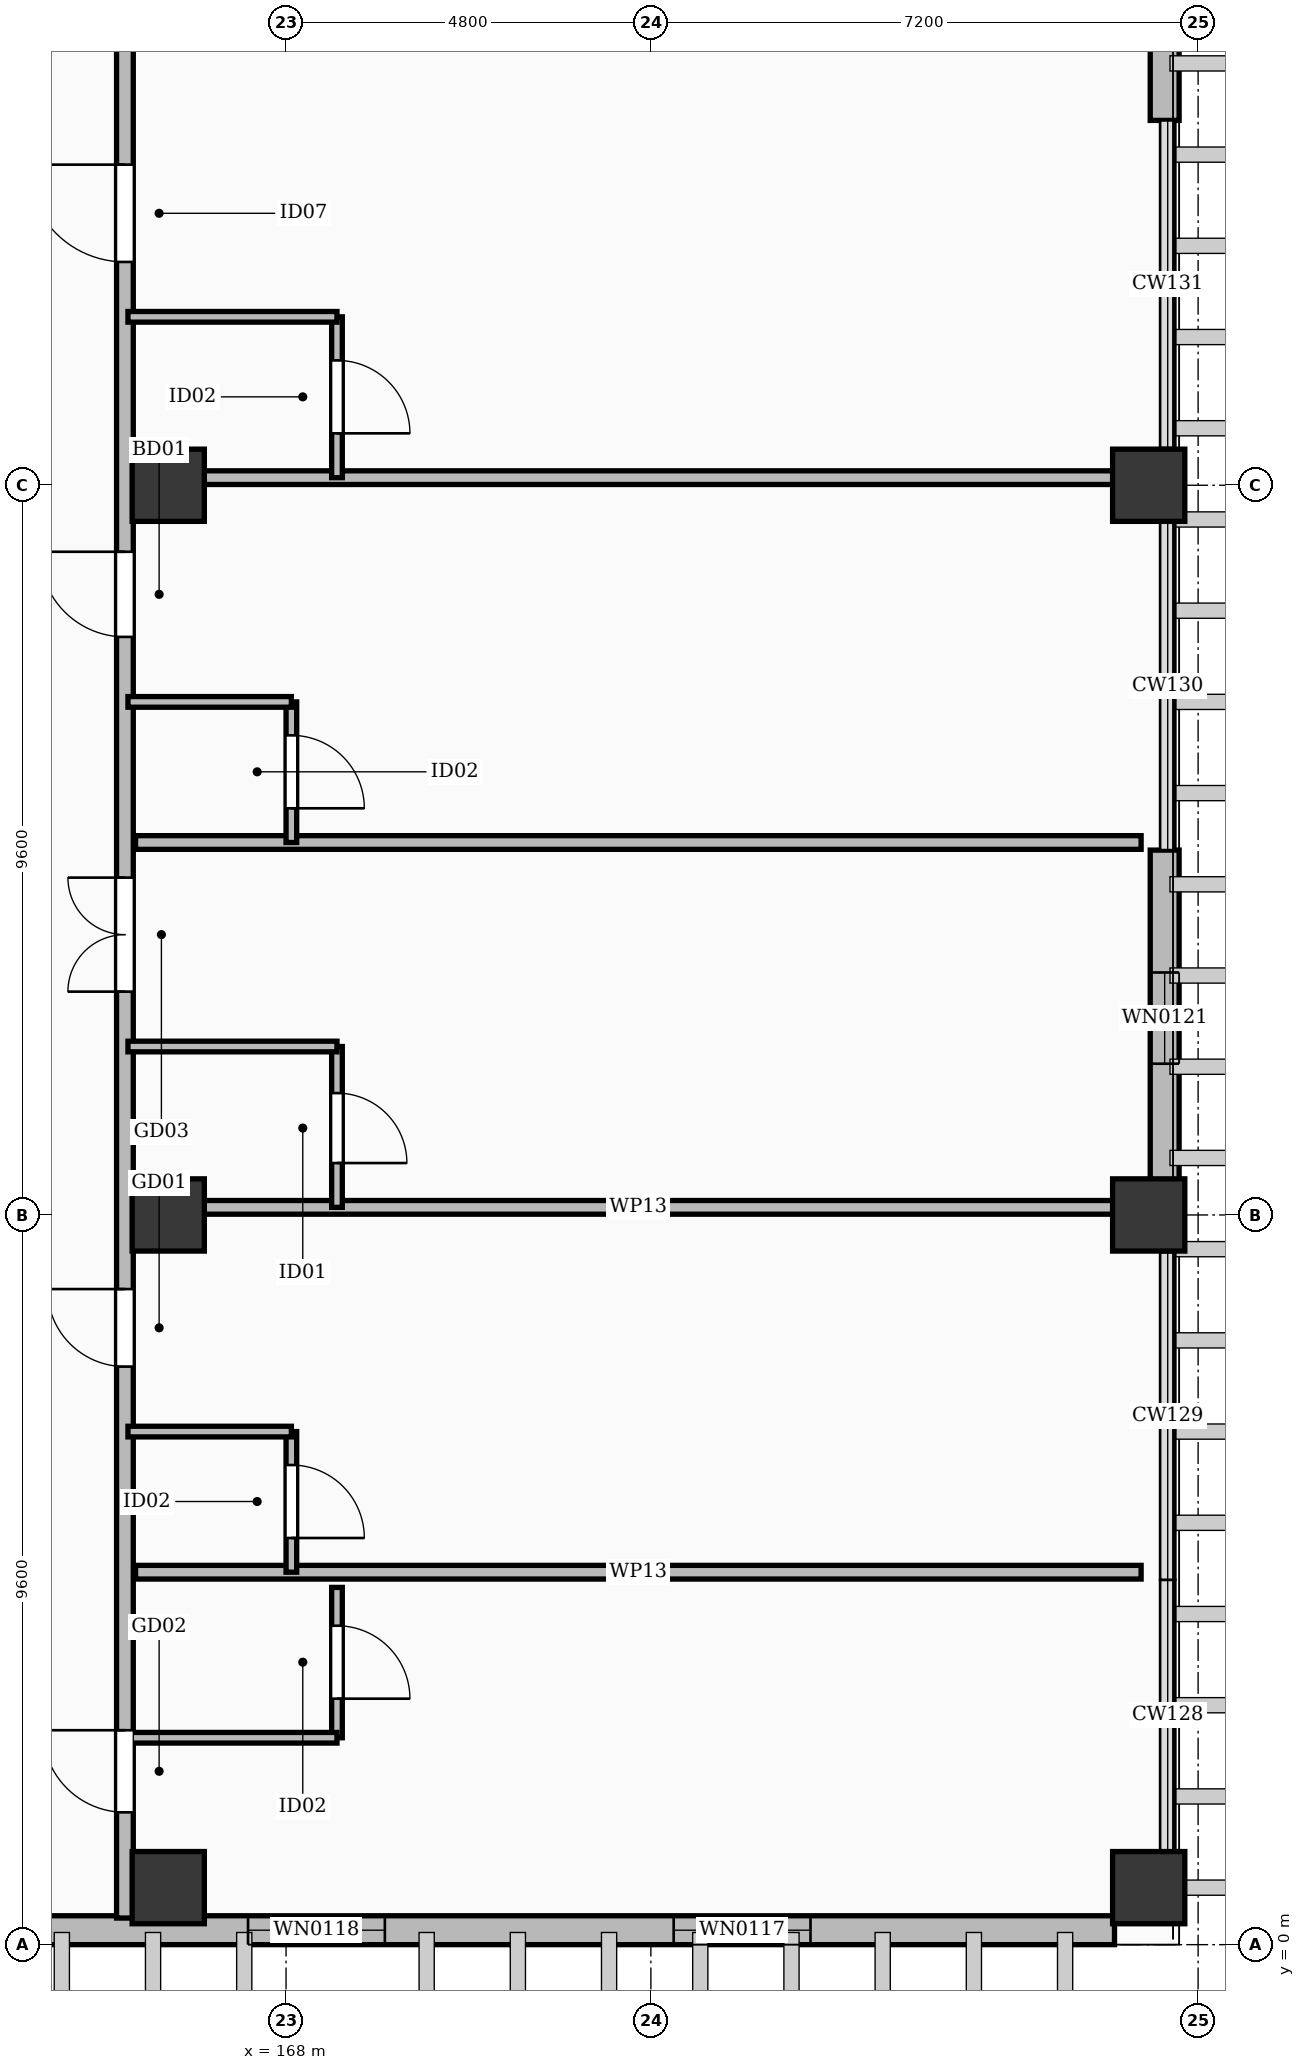
"""IFC4 building model, lengths in metres.
Left out: names, types, materials, properties, quantities, classifications, styles, units other than length and angle.
Written with IfcOpenShell. Run it as: python <this file> out.ifc"""

import sys

from ifc_helpers import new_model, si_unit, direction, frame, frame_2d, origin, origin_2d, place, context, subcontext, project, spatial, rectangle, extrude, element, fill, save


model = new_model("IFC4")
c1 = context("Model", 3, precision=1e-05, world=origin(), true_north=direction((0.0, 1.0)))
c2 = subcontext(c1, "Body", "Model", "MODEL_VIEW")
j1 = project(units=[si_unit("LENGTHUNIT", "METRE"), si_unit("PLANEANGLEUNIT", "RADIAN")], contexts=[c1])
p1 = place(None, origin())
s1 = spatial("IfcSite", under=j1, at=p1, CompositionType="ELEMENT")
p2 = place(p1, origin())
s2 = spatial("IfcBuilding", under=s1, at=p2, CompositionType="ELEMENT")
p3 = place(p2, frame((0.0, 0.0, 11.4)))
s3 = spatial("IfcBuildingStorey", under=s2, at=p3, CompositionType="ELEMENT", Elevation=11.4)
for number, where, z_axis, x_axis in (
    (1, (166.45, 0.75, 0.0), (0.0, 0.0, 1.0), (1.0, 0.0, 0.0)),
    (2, (166.45, 9.6, 0.0), (0.0, 0.0, 1.0), (1.0, 0.0, 0.0)),
    (3, (166.45, 19.2, 0.0), (0.0, 0.0, 1.0), (1.0, 0.0, 0.0)),
    (4, (179.35, 0.75, 0.0), (0.0, 0.0, 1.0), (1.0, 0.0, 0.0)),
    (5, (179.35, 9.6, 0.0), (0.0, 0.0, 1.0), (1.0, 0.0, 0.0)),
    (6, (179.35, 19.2, 0.0), (0.0, 0.0, 1.0), (1.0, 0.0, 0.0)),
):
    element("IfcColumn", number, at=place(p3, frame(where, z_axis=z_axis, x_axis=x_axis)), inside=s3, PredefinedType="COLUMN", context=c2, shape_type="SweptSolid", body=[
        extrude(rectangle(XDim=0.95, YDim=0.95, at=origin_2d()), origin(), (0.0, 0.0, 1.0), 4.8),
    ])
p4 = place(p3, frame((178.9, 0.19, 0.0), z_axis=(0.0, 0.0, 1.0), x_axis=(-1.0, 0.0, 0.0)))
e7 = element("IfcWall", 7, at=p4, inside=s3, PredefinedType="SOLIDWALL", context=c2, shape_type="SweptSolid", body=[
    extrude(rectangle(XDim=29.0, YDim=0.38, at=frame_2d((14.5, 0.0))), origin(), (0.0, 0.0, 1.0), 4.42),
])
p5 = place(p4, frame((4.0, 0.0, 0.55)))
e8 = element("IfcOpeningElement", 8, at=p5, cuts=e7, PredefinedType="OPENING", context=c2, shape_type="SweptSolid", body=[
    extrude(rectangle(XDim=1.8, YDim=1.76, at=frame_2d((0.9, 0.88))), frame((0.0, 0.202, 0.0), z_axis=(0.0, -1.0, 0.0), x_axis=(1.0, 0.0, 0.0)), (0.0, 0.0, 1.0), 0.404),
])
p6 = place(p4, frame((9.6, 0.0, 0.55)))
e9 = element("IfcOpeningElement", 9, at=p6, cuts=e7, PredefinedType="OPENING", context=c2, shape_type="SweptSolid", body=[
    extrude(rectangle(XDim=1.8, YDim=1.76, at=frame_2d((0.9, 0.88))), frame((0.0, 0.202, 0.0), z_axis=(0.0, -1.0, 0.0), x_axis=(1.0, 0.0, 0.0)), (0.0, 0.0, 1.0), 0.404),
])
p7 = place(p4, frame((20.8, 0.0, 0.55)))
e10 = element("IfcOpeningElement", 10, at=p7, cuts=e7, PredefinedType="OPENING", context=c2, shape_type="SweptSolid", body=[
    extrude(rectangle(XDim=1.8, YDim=1.76, at=frame_2d((0.9, 0.88))), frame((0.0, 0.202, 0.0), z_axis=(0.0, -1.0, 0.0), x_axis=(1.0, 0.0, 0.0)), (0.0, 0.0, 1.0), 0.404),
])
p8 = place(p4, frame((25.4, 0.0, 0.55)))
e11 = element("IfcOpeningElement", 11, at=p8, cuts=e7, PredefinedType="OPENING", context=c2, shape_type="SweptSolid", body=[
    extrude(rectangle(XDim=1.8, YDim=1.76, at=frame_2d((0.9, 0.88))), frame((0.0, 0.202, 0.0), z_axis=(0.0, -1.0, 0.0), x_axis=(1.0, 0.0, 0.0)), (0.0, 0.0, 1.0), 0.404),
])
p9 = place(p3, frame((179.56, 14.4, 0.0), z_axis=(0.0, 0.0, 1.0), x_axis=(0.0, -1.0, 0.0)))
e12 = element("IfcWall", 12, at=p9, inside=s3, PredefinedType="SOLIDWALL", context=c2, shape_type="SweptSolid", body=[
    extrude(rectangle(XDim=4.35, YDim=0.38, at=frame_2d((2.175, 0.0))), origin(), (0.0, 0.0, 1.0), 3.662),
])
p10 = place(p9, frame((1.61, 0.0, 0.55)))
e13 = element("IfcOpeningElement", 13, at=p10, cuts=e12, PredefinedType="OPENING", context=c2, shape_type="SweptSolid", body=[
    extrude(rectangle(XDim=1.2, YDim=1.72, at=frame_2d((0.6, 0.86))), frame((0.0, 0.202, 0.0), z_axis=(0.0, -1.0, 0.0), x_axis=(1.0, 0.0, 0.0)), (0.0, 0.0, 1.0), 0.404),
])
p11 = place(p3, frame((179.56, 28.35, 0.0), z_axis=(0.0, 0.0, 1.0), x_axis=(0.0, -1.0, 0.0)))
e14 = element("IfcWall", 14, at=p11, inside=s3, PredefinedType="SOLIDWALL", context=c2, shape_type="SweptSolid", body=[
    extrude(rectangle(XDim=4.35, YDim=0.38, at=frame_2d((2.175, 0.0))), origin(), (0.0, 0.0, 1.0), 3.662),
])
p12 = place(p3, frame((165.88, 0.35, 0.0), z_axis=(0.0, 0.0, 1.0), x_axis=(0.0, 1.0, 0.0)))
e15 = element("IfcWall", 15, at=p12, inside=s3, PredefinedType="PARTITIONING", context=c2, shape_type="SweptSolid", body=[
    extrude(rectangle(XDim=28.25, YDim=0.22, at=frame_2d((14.125, 0.0))), origin(), (0.0, 0.0, 1.0), 3.662),
])
p13 = place(p12, frame((1.391, 0.0, 0.0)))
e16 = element("IfcOpeningElement", 16, at=p13, cuts=e15, PredefinedType="OPENING", context=c2, shape_type="SweptSolid", body=[
    extrude(rectangle(XDim=1.08, YDim=2.25, at=frame_2d((0.54, 1.125))), frame((0.0, 0.122, 0.0), z_axis=(0.0, -1.0, 0.0), x_axis=(1.0, 0.0, 0.0)), (0.0, 0.0, 1.0), 0.244),
])
p14 = place(p12, frame((7.255, 0.0, 0.0)))
e17 = element("IfcOpeningElement", 17, at=p14, cuts=e15, PredefinedType="OPENING", context=c2, shape_type="SweptSolid", body=[
    extrude(rectangle(XDim=1.02, YDim=2.2, at=frame_2d((0.51, 1.1))), frame((0.0, 0.122, 0.0), z_axis=(0.0, -1.0, 0.0), x_axis=(1.0, 0.0, 0.0)), (0.0, 0.0, 1.0), 0.244),
])
p15 = place(p12, frame((12.188, 0.0, 0.0)))
e18 = element("IfcOpeningElement", 18, at=p15, cuts=e15, PredefinedType="OPENING", context=c2, shape_type="SweptSolid", body=[
    extrude(rectangle(XDim=1.5, YDim=2.3, at=frame_2d((0.75, 1.15))), frame((0.0, 0.122, 0.0), z_axis=(0.0, -1.0, 0.0), x_axis=(1.0, 0.0, 0.0)), (0.0, 0.0, 1.0), 0.244),
])
p16 = place(p12, frame((16.855, 0.0, 0.0)))
e19 = element("IfcOpeningElement", 19, at=p16, cuts=e15, PredefinedType="OPENING", context=c2, shape_type="SweptSolid", body=[
    extrude(rectangle(XDim=1.12, YDim=2.15, at=frame_2d((0.56, 1.075))), frame((0.0, 0.122, 0.0), z_axis=(0.0, -1.0, 0.0), x_axis=(1.0, 0.0, 0.0)), (0.0, 0.0, 1.0), 0.244),
])
p17 = place(p12, frame((21.788, 0.0, 0.0)))
e20 = element("IfcOpeningElement", 20, at=p17, cuts=e15, PredefinedType="OPENING", context=c2, shape_type="SweptSolid", body=[
    extrude(rectangle(XDim=1.28, YDim=2.16, at=frame_2d((0.64, 1.08))), frame((0.0, 0.122, 0.0), z_axis=(0.0, -1.0, 0.0), x_axis=(1.0, 0.0, 0.0)), (0.0, 0.0, 1.0), 0.244),
])
p18 = place(p3, frame((168.67, 2.722, 0.0), z_axis=(0.0, 0.0, 1.0), x_axis=(0.0, 1.0, 0.0)))
e21 = element("IfcWall", 21, at=p18, inside=s3, PredefinedType="PARTITIONING", context=c2, shape_type="SweptSolid", body=[
    extrude(rectangle(XDim=1.978, YDim=0.14, at=frame_2d((0.989, 0.0))), origin(), (0.0, 0.0, 1.0), 4.42),
])
p19 = place(p18, frame((0.514, 0.0, 0.0)))
e22 = element("IfcOpeningElement", 22, at=p19, cuts=e21, PredefinedType="OPENING", context=c2, shape_type="SweptSolid", body=[
    extrude(rectangle(XDim=0.96, YDim=2.12, at=frame_2d((0.48, 1.06))), frame((0.0, 0.082, 0.0), z_axis=(0.0, -1.0, 0.0), x_axis=(1.0, 0.0, 0.0)), (0.0, 0.0, 1.0), 0.164),
])
p20 = place(p3, frame((165.92, 2.722, 0.0), z_axis=(0.0, 0.0, 1.0), x_axis=(1.0, 0.0, 0.0)))
e23 = element("IfcWall", 23, at=p20, inside=s3, PredefinedType="PARTITIONING", context=c2, shape_type="SweptSolid", body=[
    extrude(rectangle(XDim=2.75, YDim=0.14, at=frame_2d((1.375, 0.0))), origin(), (0.0, 0.0, 1.0), 3.692),
])
p21 = place(p3, frame((166.02, 4.9, 0.0), z_axis=(0.0, 0.0, 1.0), x_axis=(1.0, 0.0, 0.0)))
e24 = element("IfcWall", 24, at=p21, inside=s3, PredefinedType="PARTITIONING", context=c2, shape_type="SweptSolid", body=[
    extrude(rectangle(XDim=13.23, YDim=0.18, at=frame_2d((6.615, 0.0))), origin(), (0.0, 0.0, 1.0), 3.662),
])
p22 = place(p3, frame((168.07, 4.9, 0.0), z_axis=(0.0, 0.0, 1.0), x_axis=(0.0, 1.0, 0.0)))
e25 = element("IfcWall", 25, at=p22, inside=s3, PredefinedType="PARTITIONING", context=c2, shape_type="SweptSolid", body=[
    extrude(rectangle(XDim=1.85, YDim=0.14, at=frame_2d((0.925, 0.0))), origin(), (0.0, 0.0, 1.0), 4.42),
])
p23 = place(p22, frame((0.45, 0.0, 0.0)))
e26 = element("IfcOpeningElement", 26, at=p23, cuts=e25, PredefinedType="OPENING", context=c2, shape_type="SweptSolid", body=[
    extrude(rectangle(XDim=0.96, YDim=2.12, at=frame_2d((0.48, 1.06))), frame((0.0, 0.082, 0.0), z_axis=(0.0, -1.0, 0.0), x_axis=(1.0, 0.0, 0.0)), (0.0, 0.0, 1.0), 0.164),
])
p24 = place(p3, frame((165.92, 6.75, 0.0), z_axis=(0.0, 0.0, 1.0), x_axis=(1.0, 0.0, 0.0)))
e27 = element("IfcWall", 27, at=p24, inside=s3, PredefinedType="PARTITIONING", context=c2, shape_type="SweptSolid", body=[
    extrude(rectangle(XDim=2.15, YDim=0.14, at=frame_2d((1.075, 0.0))), origin(), (0.0, 0.0, 1.0), 3.692),
])
p25 = place(p3, frame((166.02, 9.7, 0.0), z_axis=(0.0, 0.0, 1.0), x_axis=(1.0, 0.0, 0.0)))
e28 = element("IfcWall", 28, at=p25, inside=s3, PredefinedType="PARTITIONING", context=c2, shape_type="SweptSolid", body=[
    extrude(rectangle(XDim=13.23, YDim=0.18, at=frame_2d((6.615, 0.0))), origin(), (0.0, 0.0, 1.0), 3.662),
])
p26 = place(p3, frame((168.67, 9.7, 0.0), z_axis=(0.0, 0.0, 1.0), x_axis=(0.0, 1.0, 0.0)))
e29 = element("IfcWall", 29, at=p26, inside=s3, PredefinedType="PARTITIONING", context=c2, shape_type="SweptSolid", body=[
    extrude(rectangle(XDim=2.116, YDim=0.14, at=frame_2d((1.058, 0.0))), origin(), (0.0, 0.0, 1.0), 3.692),
])
p27 = place(p26, frame((0.583, 0.0, 0.0)))
e30 = element("IfcOpeningElement", 30, at=p27, cuts=e29, PredefinedType="OPENING", context=c2, shape_type="SweptSolid", body=[
    extrude(rectangle(XDim=0.92, YDim=2.1, at=frame_2d((0.46, 1.05))), frame((0.0, 0.082, 0.0), z_axis=(0.0, -1.0, 0.0), x_axis=(1.0, 0.0, 0.0)), (0.0, 0.0, 1.0), 0.164),
])
p28 = place(p3, frame((165.92, 11.816, 0.0), z_axis=(0.0, 0.0, 1.0), x_axis=(1.0, 0.0, 0.0)))
e31 = element("IfcWall", 31, at=p28, inside=s3, PredefinedType="PARTITIONING", context=c2, shape_type="SweptSolid", body=[
    extrude(rectangle(XDim=2.75, YDim=0.14, at=frame_2d((1.375, 0.0))), origin(), (0.0, 0.0, 1.0), 3.692),
])
p29 = place(p3, frame((166.02, 14.5, 0.0), z_axis=(0.0, 0.0, 1.0), x_axis=(1.0, 0.0, 0.0)))
e32 = element("IfcWall", 32, at=p29, inside=s3, PredefinedType="PARTITIONING", context=c2, shape_type="SweptSolid", body=[
    extrude(rectangle(XDim=13.23, YDim=0.18, at=frame_2d((6.615, 0.0))), origin(), (0.0, 0.0, 1.0), 3.662),
])
p30 = place(p3, frame((168.07, 14.5, 0.0), z_axis=(0.0, 0.0, 1.0), x_axis=(0.0, 1.0, 0.0)))
e33 = element("IfcWall", 33, at=p30, inside=s3, PredefinedType="PARTITIONING", context=c2, shape_type="SweptSolid", body=[
    extrude(rectangle(XDim=1.85, YDim=0.14, at=frame_2d((0.925, 0.0))), origin(), (0.0, 0.0, 1.0), 4.42),
])
p31 = place(p30, frame((0.45, 0.0, 0.0)))
e34 = element("IfcOpeningElement", 34, at=p31, cuts=e33, PredefinedType="OPENING", context=c2, shape_type="SweptSolid", body=[
    extrude(rectangle(XDim=0.96, YDim=2.12, at=frame_2d((0.48, 1.06))), frame((0.0, 0.082, 0.0), z_axis=(0.0, -1.0, 0.0), x_axis=(1.0, 0.0, 0.0)), (0.0, 0.0, 1.0), 0.164),
])
p32 = place(p3, frame((165.92, 16.35, 0.0), z_axis=(0.0, 0.0, 1.0), x_axis=(1.0, 0.0, 0.0)))
e35 = element("IfcWall", 35, at=p32, inside=s3, PredefinedType="PARTITIONING", context=c2, shape_type="SweptSolid", body=[
    extrude(rectangle(XDim=2.15, YDim=0.14, at=frame_2d((1.075, 0.0))), origin(), (0.0, 0.0, 1.0), 3.692),
])
p33 = place(p3, frame((166.02, 19.3, 0.0), z_axis=(0.0, 0.0, 1.0), x_axis=(1.0, 0.0, 0.0)))
e36 = element("IfcWall", 36, at=p33, inside=s3, PredefinedType="PARTITIONING", context=c2, shape_type="SweptSolid", body=[
    extrude(rectangle(XDim=13.23, YDim=0.18, at=frame_2d((6.615, 0.0))), origin(), (0.0, 0.0, 1.0), 3.662),
])
p34 = place(p3, frame((168.67, 19.3, 0.0), z_axis=(0.0, 0.0, 1.0), x_axis=(0.0, 1.0, 0.0)))
e37 = element("IfcWall", 37, at=p34, inside=s3, PredefinedType="PARTITIONING", context=c2, shape_type="SweptSolid", body=[
    extrude(rectangle(XDim=2.116, YDim=0.14, at=frame_2d((1.058, 0.0))), origin(), (0.0, 0.0, 1.0), 3.692),
])
p35 = place(p34, frame((0.583, 0.0, 0.0)))
e38 = element("IfcOpeningElement", 38, at=p35, cuts=e37, PredefinedType="OPENING", context=c2, shape_type="SweptSolid", body=[
    extrude(rectangle(XDim=0.96, YDim=2.12, at=frame_2d((0.48, 1.06))), frame((0.0, 0.082, 0.0), z_axis=(0.0, -1.0, 0.0), x_axis=(1.0, 0.0, 0.0)), (0.0, 0.0, 1.0), 0.164),
])
p36 = place(p3, frame((165.92, 21.416, 0.0), z_axis=(0.0, 0.0, 1.0), x_axis=(1.0, 0.0, 0.0)))
e39 = element("IfcWall", 39, at=p36, inside=s3, PredefinedType="PARTITIONING", context=c2, shape_type="SweptSolid", body=[
    extrude(rectangle(XDim=2.75, YDim=0.14, at=frame_2d((1.375, 0.0))), origin(), (0.0, 0.0, 1.0), 3.692),
])
p37 = place(p5, origin())
e40 = element("IfcWindow", 40, at=p37, inside=s3, PartitioningType="SINGLE_PANEL", PredefinedType="WINDOW", context=c2, shape_type="SweptSolid", body=[
    extrude(rectangle(XDim=1.8, YDim=1.76, at=frame_2d((0.9, 0.88))), frame((0.0, 0.03, 0.0), z_axis=(0.0, -1.0, 0.0), x_axis=(1.0, 0.0, 0.0)), (0.0, 0.0, 1.0), 0.06),
])
fill(e8, e40)
p38 = place(p6, origin())
e41 = element("IfcWindow", 41, at=p38, inside=s3, PartitioningType="SINGLE_PANEL", PredefinedType="WINDOW", context=c2, shape_type="SweptSolid", body=[
    extrude(rectangle(XDim=1.8, YDim=1.76, at=frame_2d((0.9, 0.88))), frame((0.0, 0.03, 0.0), z_axis=(0.0, -1.0, 0.0), x_axis=(1.0, 0.0, 0.0)), (0.0, 0.0, 1.0), 0.06),
])
fill(e9, e41)
p39 = place(p10, origin())
e42 = element("IfcWindow", 42, at=p39, inside=s3, PartitioningType="SINGLE_PANEL", PredefinedType="WINDOW", context=c2, shape_type="SweptSolid", body=[
    extrude(rectangle(XDim=1.2, YDim=1.72, at=frame_2d((0.6, 0.86))), frame((0.0, 0.03, 0.0), z_axis=(0.0, -1.0, 0.0), x_axis=(1.0, 0.0, 0.0)), (0.0, 0.0, 1.0), 0.06),
])
fill(e13, e42)
p40 = place(p13, origin())
e43 = element("IfcDoor", 43, at=p40, inside=s3, OperationType="SINGLE_SWING_RIGHT", PredefinedType="DOOR", context=c2, shape_type="SweptSolid", body=[
    extrude(rectangle(XDim=1.08, YDim=2.25, at=frame_2d((0.54, 1.125))), frame((0.0, 0.025, 0.0), z_axis=(0.0, -1.0, 0.0), x_axis=(1.0, 0.0, 0.0)), (0.0, 0.0, 1.0), 0.05),
])
fill(e16, e43)
p41 = place(p19, frame((0.96, 0.0, 0.0), z_axis=(0.0, 0.0, 1.0), x_axis=(-1.0, 0.0, 0.0)))
e44 = element("IfcDoor", 44, at=p41, inside=s3, OperationType="SINGLE_SWING_LEFT", PredefinedType="DOOR", context=c2, shape_type="SweptSolid", body=[
    extrude(rectangle(XDim=0.96, YDim=2.12, at=frame_2d((0.48, 1.06))), frame((0.0, 0.025, 0.0), z_axis=(0.0, -1.0, 0.0), x_axis=(1.0, 0.0, 0.0)), (0.0, 0.0, 1.0), 0.05),
])
fill(e22, e44)
p42 = place(p14, origin())
e45 = element("IfcDoor", 45, at=p42, inside=s3, OperationType="SINGLE_SWING_RIGHT", PredefinedType="DOOR", context=c2, shape_type="SweptSolid", body=[
    extrude(rectangle(XDim=1.02, YDim=2.2, at=frame_2d((0.51, 1.1))), frame((0.0, 0.025, 0.0), z_axis=(0.0, -1.0, 0.0), x_axis=(1.0, 0.0, 0.0)), (0.0, 0.0, 1.0), 0.05),
])
fill(e17, e45)
p43 = place(p23, frame((0.96, 0.0, 0.0), z_axis=(0.0, 0.0, 1.0), x_axis=(-1.0, 0.0, 0.0)))
e46 = element("IfcDoor", 46, at=p43, inside=s3, OperationType="SINGLE_SWING_LEFT", PredefinedType="DOOR", context=c2, shape_type="SweptSolid", body=[
    extrude(rectangle(XDim=0.96, YDim=2.12, at=frame_2d((0.48, 1.06))), frame((0.0, 0.025, 0.0), z_axis=(0.0, -1.0, 0.0), x_axis=(1.0, 0.0, 0.0)), (0.0, 0.0, 1.0), 0.05),
])
fill(e26, e46)
p44 = place(p15, origin())
e47 = element("IfcDoor", 47, at=p44, inside=s3, OperationType="DOUBLE_DOOR_SINGLE_SWING", PredefinedType="DOOR", context=c2, shape_type="SweptSolid", body=[
    extrude(rectangle(XDim=1.5, YDim=2.3, at=frame_2d((0.75, 1.15))), frame((0.0, 0.025, 0.0), z_axis=(0.0, -1.0, 0.0), x_axis=(1.0, 0.0, 0.0)), (0.0, 0.0, 1.0), 0.05),
])
fill(e18, e47)
p45 = place(p27, frame((0.92, 0.0, 0.0), z_axis=(0.0, 0.0, 1.0), x_axis=(-1.0, 0.0, 0.0)))
e48 = element("IfcDoor", 48, at=p45, inside=s3, OperationType="SINGLE_SWING_LEFT", PredefinedType="DOOR", context=c2, shape_type="SweptSolid", body=[
    extrude(rectangle(XDim=0.92, YDim=2.1, at=frame_2d((0.46, 1.05))), frame((0.0, 0.025, 0.0), z_axis=(0.0, -1.0, 0.0), x_axis=(1.0, 0.0, 0.0)), (0.0, 0.0, 1.0), 0.05),
])
fill(e30, e48)
p46 = place(p16, origin())
e49 = element("IfcDoor", 49, at=p46, inside=s3, OperationType="SINGLE_SWING_RIGHT", PredefinedType="DOOR", context=c2, shape_type="SweptSolid", body=[
    extrude(rectangle(XDim=1.12, YDim=2.15, at=frame_2d((0.56, 1.075))), frame((0.0, 0.025, 0.0), z_axis=(0.0, -1.0, 0.0), x_axis=(1.0, 0.0, 0.0)), (0.0, 0.0, 1.0), 0.05),
])
fill(e19, e49)
p47 = place(p31, frame((0.96, 0.0, 0.0), z_axis=(0.0, 0.0, 1.0), x_axis=(-1.0, 0.0, 0.0)))
e50 = element("IfcDoor", 50, at=p47, inside=s3, OperationType="SINGLE_SWING_LEFT", PredefinedType="DOOR", context=c2, shape_type="SweptSolid", body=[
    extrude(rectangle(XDim=0.96, YDim=2.12, at=frame_2d((0.48, 1.06))), frame((0.0, 0.025, 0.0), z_axis=(0.0, -1.0, 0.0), x_axis=(1.0, 0.0, 0.0)), (0.0, 0.0, 1.0), 0.05),
])
fill(e34, e50)
p48 = place(p17, origin())
e51 = element("IfcDoor", 51, at=p48, inside=s3, OperationType="SINGLE_SWING_RIGHT", PredefinedType="DOOR", context=c2, shape_type="SweptSolid", body=[
    extrude(rectangle(XDim=1.28, YDim=2.16, at=frame_2d((0.64, 1.08))), frame((0.0, 0.025, 0.0), z_axis=(0.0, -1.0, 0.0), x_axis=(1.0, 0.0, 0.0)), (0.0, 0.0, 1.0), 0.05),
])
fill(e20, e51)
p49 = place(p35, frame((0.96, 0.0, 0.0), z_axis=(0.0, 0.0, 1.0), x_axis=(-1.0, 0.0, 0.0)))
e52 = element("IfcDoor", 52, at=p49, inside=s3, OperationType="SINGLE_SWING_LEFT", PredefinedType="DOOR", context=c2, shape_type="SweptSolid", body=[
    extrude(rectangle(XDim=0.96, YDim=2.12, at=frame_2d((0.48, 1.06))), frame((0.0, 0.025, 0.0), z_axis=(0.0, -1.0, 0.0), x_axis=(1.0, 0.0, 0.0)), (0.0, 0.0, 1.0), 0.05),
])
fill(e38, e52)
save(model, sys.argv[1])
